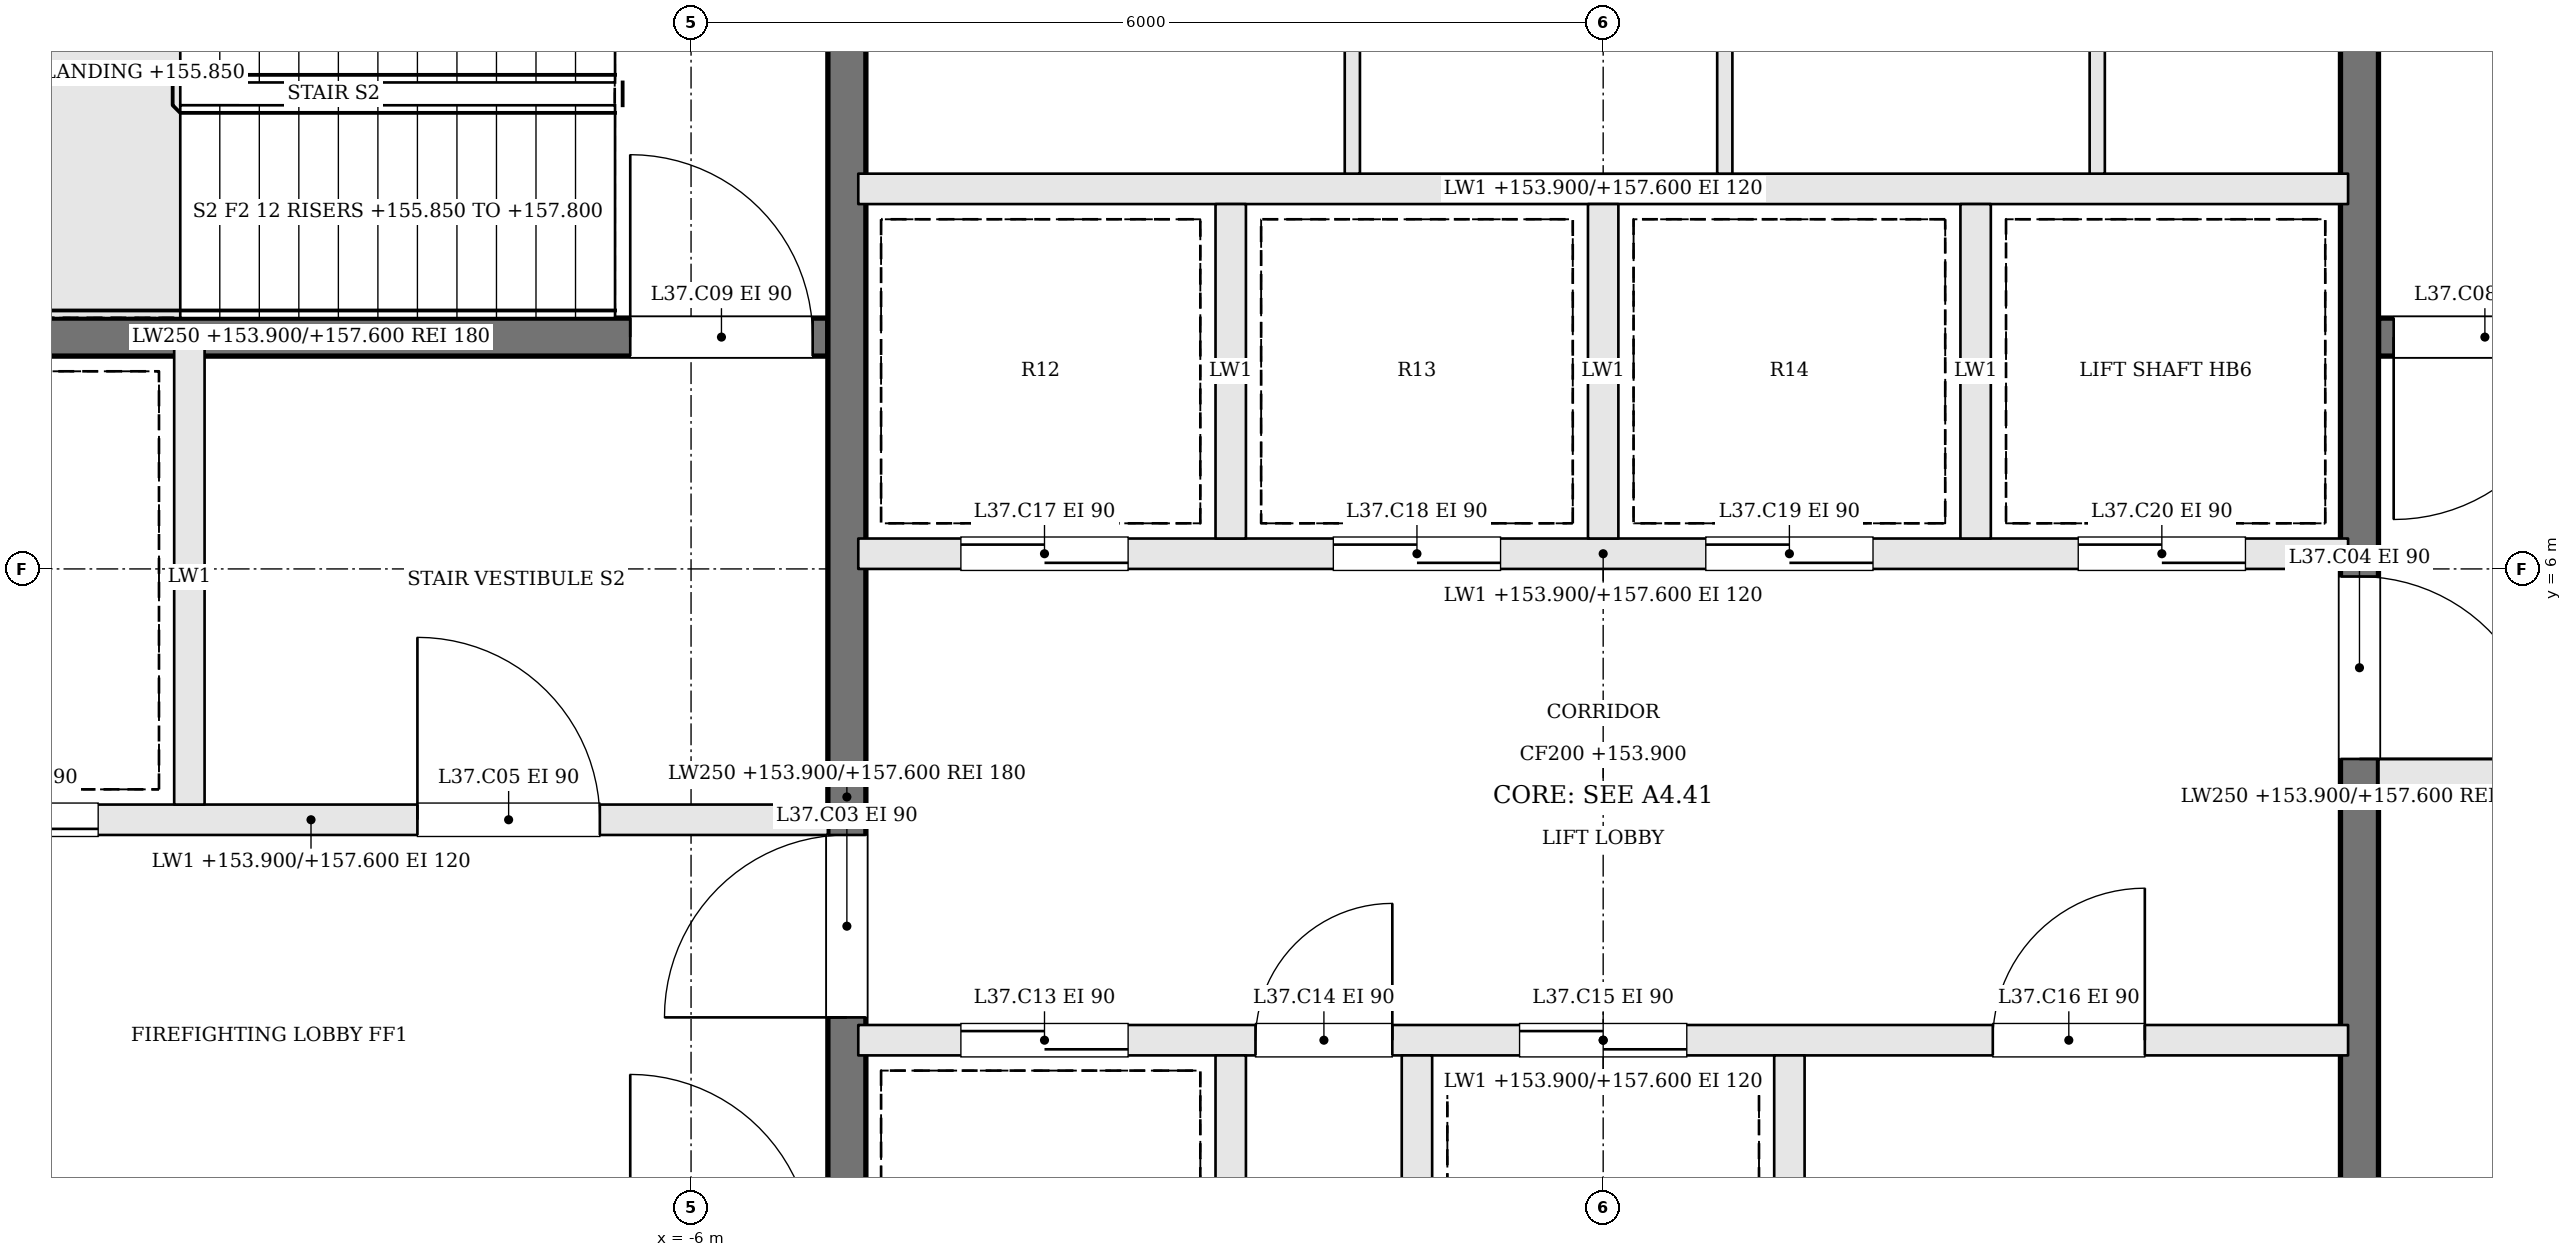
"""IFC4 building model, lengths in metres.
Left out: names, types, materials, properties, quantities, classifications, styles, units other than length and angle.
Written with IfcOpenShell. Run it as: python <this file> out.ifc"""

import sys

from ifc_helpers import new_model, si_unit, direction, frame, frame_2d, origin, place, context, subcontext, project, spatial, rectangle, extrude, element, fill, save


model = new_model("IFC4")
c1 = context("Model", 3, precision=1e-05, world=origin(), true_north=direction((0.0, 1.0)))
c2 = subcontext(c1, "Body", "Model", "MODEL_VIEW")
j1 = project(units=[si_unit("LENGTHUNIT", "METRE"), si_unit("PLANEANGLEUNIT", "RADIAN")], contexts=[c1])
p1 = place(None, origin())
s1 = spatial("IfcSite", under=j1, at=p1, CompositionType="ELEMENT")
p2 = place(p1, origin())
s2 = spatial("IfcBuilding", under=s1, at=p2, CompositionType="ELEMENT")
p3 = place(p2, frame((0.0, 0.0, 153.9)))
s3 = spatial("IfcBuildingStorey", under=s2, at=p3, CompositionType="ELEMENT", Elevation=153.9)
p4 = place(p3, frame((11.9, 7.525, 0.0), z_axis=(0.0, 0.0, 1.0), x_axis=(-1.0, 0.0, 0.0)))
e1 = element("IfcWall", 1, at=p4, inside=s3, PredefinedType="SOLIDWALL", context=c2, shape_type="SweptSolid", body=[
    extrude(rectangle(XDim=6.8, YDim=0.25, at=frame_2d((3.4, 0.0))), origin(), (0.0, 0.0, 1.0), 3.7),
])
p5 = place(p4, frame((5.5, 0.0, 0.0)))
e2 = element("IfcOpeningElement", 2, at=p5, cuts=e1, PredefinedType="OPENING", context=c2, shape_type="SweptSolid", body=[
    extrude(rectangle(XDim=1.2, YDim=2.1, at=frame_2d((0.6, 1.05))), frame((0.0, 0.135, 0.0), z_axis=(0.0, -1.0, 0.0), x_axis=(1.0, 0.0, 0.0)), (0.0, 0.0, 1.0), 0.27),
])
p6 = place(p3, frame((-11.9, 4.35, 0.0), z_axis=(0.0, 0.0, 1.0), x_axis=(1.0, 0.0, 0.0)))
e3 = element("IfcWall", 3, at=p6, inside=s3, PredefinedType="SOLIDWALL", context=c2, shape_type="SweptSolid", body=[
    extrude(rectangle(XDim=6.8, YDim=0.2, at=frame_2d((3.4, 0.0))), origin(), (0.0, 0.0, 1.0), 3.7),
])
p7 = place(p6, frame((4.1, 0.0, 0.0)))
e4 = element("IfcOpeningElement", 4, at=p7, cuts=e3, PredefinedType="OPENING", context=c2, shape_type="SweptSolid", body=[
    extrude(rectangle(XDim=1.2, YDim=2.1, at=frame_2d((0.6, 1.05))), frame((0.0, 0.11, 0.0), z_axis=(0.0, -1.0, 0.0), x_axis=(1.0, 0.0, 0.0)), (0.0, 0.0, 1.0), 0.22),
])
p8 = place(p6, frame((0.8, 0.0, 0.0)))
e5 = element("IfcOpeningElement", 5, at=p8, cuts=e3, PredefinedType="OPENING", context=c2, shape_type="SweptSolid", body=[
    extrude(rectangle(XDim=1.2, YDim=2.1, at=frame_2d((0.6, 1.05))), frame((0.0, 0.11, 0.0), z_axis=(0.0, -1.0, 0.0), x_axis=(1.0, 0.0, 0.0)), (0.0, 0.0, 1.0), 0.22),
])
p9 = place(p3, frame((11.9, 4.65, 0.0), z_axis=(0.0, 0.0, 1.0), x_axis=(-1.0, 0.0, 0.0)))
e6 = element("IfcWall", 6, at=p9, inside=s3, PredefinedType="SOLIDWALL", context=c2, shape_type="SweptSolid", body=[
    extrude(rectangle(XDim=6.8, YDim=0.2, at=frame_2d((3.4, 0.0))), origin(), (0.0, 0.0, 1.0), 3.7),
])
p10 = place(p9, frame((4.1, 0.0, 0.0)))
e7 = element("IfcOpeningElement", 7, at=p10, cuts=e6, PredefinedType="OPENING", context=c2, shape_type="SweptSolid", body=[
    extrude(rectangle(XDim=1.2, YDim=2.1, at=frame_2d((0.6, 1.05))), frame((0.0, 0.11, 0.0), z_axis=(0.0, -1.0, 0.0), x_axis=(1.0, 0.0, 0.0)), (0.0, 0.0, 1.0), 0.22),
])
p11 = place(p9, frame((0.8, 0.0, 0.0)))
e8 = element("IfcOpeningElement", 8, at=p11, cuts=e6, PredefinedType="OPENING", context=c2, shape_type="SweptSolid", body=[
    extrude(rectangle(XDim=1.2, YDim=2.1, at=frame_2d((0.6, 1.05))), frame((0.0, 0.11, 0.0), z_axis=(0.0, -1.0, 0.0), x_axis=(1.0, 0.0, 0.0)), (0.0, 0.0, 1.0), 0.22),
])
p12 = place(p3, frame((-11.9, 7.525, 0.0), z_axis=(0.0, 0.0, 1.0), x_axis=(1.0, 0.0, 0.0)))
e9 = element("IfcWall", 9, at=p12, inside=s3, PredefinedType="SOLIDWALL", context=c2, shape_type="SweptSolid", body=[
    extrude(rectangle(XDim=6.8, YDim=0.25, at=frame_2d((3.4, 0.0))), origin(), (0.0, 0.0, 1.0), 3.7),
])
p13 = place(p12, frame((5.5, 0.0, 0.0)))
e10 = element("IfcOpeningElement", 10, at=p13, cuts=e9, PredefinedType="OPENING", context=c2, shape_type="SweptSolid", body=[
    extrude(rectangle(XDim=1.2, YDim=2.1, at=frame_2d((0.6, 1.05))), frame((0.0, 0.135, 0.0), z_axis=(0.0, -1.0, 0.0), x_axis=(1.0, 0.0, 0.0)), (0.0, 0.0, 1.0), 0.27),
])
p14 = place(p3, frame((-9.3, 4.45, 0.0), z_axis=(0.0, 0.0, 1.0), x_axis=(0.0, 1.0, 0.0)))
e11 = element("IfcWall", 11, at=p14, inside=s3, PredefinedType="SOLIDWALL", context=c2, shape_type="SweptSolid", body=[
    extrude(rectangle(XDim=3.0, YDim=0.2, at=frame_2d((1.5, 0.0))), origin(), (0.0, 0.0, 1.0), 3.7),
])
p15 = place(p3, frame((-4.975, -1.9, 0.0), z_axis=(0.0, 0.0, 1.0), x_axis=(0.0, 1.0, 0.0)))
e12 = element("IfcWall", 12, at=p15, inside=s3, PredefinedType="SOLIDWALL", context=c2, shape_type="SweptSolid", body=[
    extrude(rectangle(XDim=12.8, YDim=0.25, at=frame_2d((6.4, 0.0))), origin(), (0.0, 0.0, 1.0), 3.7),
])
p16 = place(p15, frame((4.95, 0.0, 0.0)))
e13 = element("IfcOpeningElement", 13, at=p16, cuts=e12, PredefinedType="OPENING", context=c2, shape_type="SweptSolid", body=[
    extrude(rectangle(XDim=1.2, YDim=2.1, at=frame_2d((0.6, 1.05))), frame((0.0, 0.135, 0.0), z_axis=(0.0, -1.0, 0.0), x_axis=(1.0, 0.0, 0.0)), (0.0, 0.0, 1.0), 0.27),
])
p17 = place(p3, frame((4.975, 10.9, 0.0), z_axis=(0.0, 0.0, 1.0), x_axis=(0.0, -1.0, 0.0)))
e14 = element("IfcWall", 14, at=p17, inside=s3, PredefinedType="SOLIDWALL", context=c2, shape_type="SweptSolid", body=[
    extrude(rectangle(XDim=12.8, YDim=0.25, at=frame_2d((6.4, 0.0))), origin(), (0.0, 0.0, 1.0), 3.7),
])
p18 = place(p17, frame((4.95, 0.0, 0.0)))
e15 = element("IfcOpeningElement", 15, at=p18, cuts=e14, PredefinedType="OPENING", context=c2, shape_type="SweptSolid", body=[
    extrude(rectangle(XDim=1.2, YDim=2.1, at=frame_2d((0.6, 1.05))), frame((0.0, 0.135, 0.0), z_axis=(0.0, -1.0, 0.0), x_axis=(1.0, 0.0, 0.0)), (0.0, 0.0, 1.0), 0.27),
])
p19 = place(p3, frame((-4.9, 2.9, 0.0), z_axis=(0.0, 0.0, 1.0), x_axis=(1.0, 0.0, 0.0)))
e16 = element("IfcWall", 16, at=p19, inside=s3, PredefinedType="SOLIDWALL", context=c2, shape_type="SweptSolid", body=[
    extrude(rectangle(XDim=9.8, YDim=0.2, at=frame_2d((4.9, 0.0))), origin(), (0.0, 0.0, 1.0), 3.7),
])
p20 = place(p19, frame((0.675, 0.0, 0.0)))
e17 = element("IfcOpeningElement", 17, at=p20, cuts=e16, PredefinedType="OPENING", context=c2, shape_type="SweptSolid", body=[
    extrude(rectangle(XDim=1.1, YDim=2.1, at=frame_2d((0.55, 1.05))), frame((0.0, 0.11, 0.0), z_axis=(0.0, -1.0, 0.0), x_axis=(1.0, 0.0, 0.0)), (0.0, 0.0, 1.0), 0.22),
])
p21 = place(p19, frame((2.613, 0.0, 0.0)))
e18 = element("IfcOpeningElement", 18, at=p21, cuts=e16, PredefinedType="OPENING", context=c2, shape_type="SweptSolid", body=[
    extrude(rectangle(XDim=0.9, YDim=2.1, at=frame_2d((0.45, 1.05))), frame((0.0, 0.11, 0.0), z_axis=(0.0, -1.0, 0.0), x_axis=(1.0, 0.0, 0.0)), (0.0, 0.0, 1.0), 0.22),
])
p22 = place(p19, frame((4.35, 0.0, 0.0)))
e19 = element("IfcOpeningElement", 19, at=p22, cuts=e16, PredefinedType="OPENING", context=c2, shape_type="SweptSolid", body=[
    extrude(rectangle(XDim=1.1, YDim=2.1, at=frame_2d((0.55, 1.05))), frame((0.0, 0.11, 0.0), z_axis=(0.0, -1.0, 0.0), x_axis=(1.0, 0.0, 0.0)), (0.0, 0.0, 1.0), 0.22),
])
p23 = place(p19, frame((7.463, 0.0, 0.0)))
e20 = element("IfcOpeningElement", 20, at=p23, cuts=e16, PredefinedType="OPENING", context=c2, shape_type="SweptSolid", body=[
    extrude(rectangle(XDim=1.0, YDim=2.1, at=frame_2d((0.5, 1.05))), frame((0.0, 0.11, 0.0), z_axis=(0.0, -1.0, 0.0), x_axis=(1.0, 0.0, 0.0)), (0.0, 0.0, 1.0), 0.22),
])
p24 = place(p3, frame((-4.9, 6.1, 0.0), z_axis=(0.0, 0.0, 1.0), x_axis=(1.0, 0.0, 0.0)))
e21 = element("IfcWall", 21, at=p24, inside=s3, PredefinedType="SOLIDWALL", context=c2, shape_type="SweptSolid", body=[
    extrude(rectangle(XDim=9.8, YDim=0.2, at=frame_2d((4.9, 0.0))), origin(), (0.0, 0.0, 1.0), 3.7),
])
p25 = place(p24, frame((0.675, 0.0, 0.0)))
e22 = element("IfcOpeningElement", 22, at=p25, cuts=e21, PredefinedType="OPENING", context=c2, shape_type="SweptSolid", body=[
    extrude(rectangle(XDim=1.1, YDim=2.1, at=frame_2d((0.55, 1.05))), frame((0.0, 0.11, 0.0), z_axis=(0.0, -1.0, 0.0), x_axis=(1.0, 0.0, 0.0)), (0.0, 0.0, 1.0), 0.22),
])
p26 = place(p24, frame((3.125, 0.0, 0.0)))
e23 = element("IfcOpeningElement", 23, at=p26, cuts=e21, PredefinedType="OPENING", context=c2, shape_type="SweptSolid", body=[
    extrude(rectangle(XDim=1.1, YDim=2.1, at=frame_2d((0.55, 1.05))), frame((0.0, 0.11, 0.0), z_axis=(0.0, -1.0, 0.0), x_axis=(1.0, 0.0, 0.0)), (0.0, 0.0, 1.0), 0.22),
])
p27 = place(p24, frame((5.575, 0.0, 0.0)))
e24 = element("IfcOpeningElement", 24, at=p27, cuts=e21, PredefinedType="OPENING", context=c2, shape_type="SweptSolid", body=[
    extrude(rectangle(XDim=1.1, YDim=2.1, at=frame_2d((0.55, 1.05))), frame((0.0, 0.11, 0.0), z_axis=(0.0, -1.0, 0.0), x_axis=(1.0, 0.0, 0.0)), (0.0, 0.0, 1.0), 0.22),
])
p28 = place(p24, frame((8.025, 0.0, 0.0)))
e25 = element("IfcOpeningElement", 25, at=p28, cuts=e21, PredefinedType="OPENING", context=c2, shape_type="SweptSolid", body=[
    extrude(rectangle(XDim=1.1, YDim=2.1, at=frame_2d((0.55, 1.05))), frame((0.0, 0.11, 0.0), z_axis=(0.0, -1.0, 0.0), x_axis=(1.0, 0.0, 0.0)), (0.0, 0.0, 1.0), 0.22),
])
p29 = place(p3, frame((-4.9, 8.5, 0.0), z_axis=(0.0, 0.0, 1.0), x_axis=(1.0, 0.0, 0.0)))
e26 = element("IfcWall", 26, at=p29, inside=s3, PredefinedType="SOLIDWALL", context=c2, shape_type="SweptSolid", body=[
    extrude(rectangle(XDim=9.8, YDim=0.2, at=frame_2d((4.9, 0.0))), origin(), (0.0, 0.0, 1.0), 3.7),
])
for number, where, z_axis, x_axis in (
    (27, (-2.45, 0.6, 0.0), (0.0, 0.0, 1.0), (0.0, 1.0, 0.0)),
    (28, (-1.225, 0.6, 0.0), (0.0, 0.0, 1.0), (0.0, 1.0, 0.0)),
    (29, (1.225, 0.6, 0.0), (0.0, 0.0, 1.0), (0.0, 1.0, 0.0)),
    (30, (-2.45, 6.2, 0.0), (0.0, 0.0, 1.0), (0.0, 1.0, 0.0)),
    (31, (0.0, 6.2, 0.0), (0.0, 0.0, 1.0), (0.0, 1.0, 0.0)),
    (32, (2.45, 6.2, 0.0), (0.0, 0.0, 1.0), (0.0, 1.0, 0.0)),
):
    element("IfcWall", number, at=place(p3, frame(where, z_axis=z_axis, x_axis=x_axis)), inside=s3, PredefinedType="SOLIDWALL", context=c2, shape_type="SweptSolid", body=[
        extrude(rectangle(XDim=2.2, YDim=0.2, at=frame_2d((1.1, 0.0))), origin(), (0.0, 0.0, 1.0), 3.7),
    ])
for number, where, z_axis, x_axis in (
    (33, (-1.65, 8.6, 0.0), (0.0, 0.0, 1.0), (0.0, 1.0, 0.0)),
    (34, (0.8, 8.6, 0.0), (0.0, 0.0, 1.0), (0.0, 1.0, 0.0)),
    (35, (3.25, 8.6, 0.0), (0.0, 0.0, 1.0), (0.0, 1.0, 0.0)),
):
    element("IfcWall", number, at=place(p3, frame(where, z_axis=z_axis, x_axis=x_axis)), inside=s3, PredefinedType="PARTITIONING", context=c2, shape_type="SweptSolid", body=[
        extrude(rectangle(XDim=2.3, YDim=0.1, at=frame_2d((1.15, 0.0))), origin(), (0.0, 0.0, 1.0), 3.7),
    ])
p30 = place(p16, origin())
e36 = element("IfcDoor", 36, at=p30, inside=s3, OperationType="SINGLE_SWING_LEFT", PredefinedType="DOOR", context=c2, shape_type="SweptSolid", body=[
    extrude(rectangle(XDim=1.2, YDim=2.1, at=frame_2d((0.6, 1.05))), frame((0.0, 0.025, 0.0), z_axis=(0.0, -1.0, 0.0), x_axis=(1.0, 0.0, 0.0)), (0.0, 0.0, 1.0), 0.05),
])
fill(e13, e36)
p31 = place(p18, origin())
e37 = element("IfcDoor", 37, at=p31, inside=s3, OperationType="SINGLE_SWING_RIGHT", PredefinedType="DOOR", context=c2, shape_type="SweptSolid", body=[
    extrude(rectangle(XDim=1.2, YDim=2.1, at=frame_2d((0.6, 1.05))), frame((0.0, 0.025, 0.0), z_axis=(0.0, -1.0, 0.0), x_axis=(1.0, 0.0, 0.0)), (0.0, 0.0, 1.0), 0.05),
])
fill(e15, e37)
p32 = place(p7, origin())
e38 = element("IfcDoor", 38, at=p32, inside=s3, OperationType="SINGLE_SWING_LEFT", PredefinedType="DOOR", context=c2, shape_type="SweptSolid", body=[
    extrude(rectangle(XDim=1.2, YDim=2.1, at=frame_2d((0.6, 1.05))), frame((0.0, 0.025, 0.0), z_axis=(0.0, -1.0, 0.0), x_axis=(1.0, 0.0, 0.0)), (0.0, 0.0, 1.0), 0.05),
])
fill(e4, e38)
p33 = place(p5, origin())
e39 = element("IfcDoor", 39, at=p33, inside=s3, OperationType="SINGLE_SWING_RIGHT", PredefinedType="DOOR", context=c2, shape_type="SweptSolid", body=[
    extrude(rectangle(XDim=1.2, YDim=2.1, at=frame_2d((0.6, 1.05))), frame((0.0, 0.025, 0.0), z_axis=(0.0, -1.0, 0.0), x_axis=(1.0, 0.0, 0.0)), (0.0, 0.0, 1.0), 0.05),
])
fill(e2, e39)
p34 = place(p13, origin())
e40 = element("IfcDoor", 40, at=p34, inside=s3, OperationType="SINGLE_SWING_LEFT", PredefinedType="DOOR", context=c2, shape_type="SweptSolid", body=[
    extrude(rectangle(XDim=1.2, YDim=2.1, at=frame_2d((0.6, 1.05))), frame((0.0, 0.025, 0.0), z_axis=(0.0, -1.0, 0.0), x_axis=(1.0, 0.0, 0.0)), (0.0, 0.0, 1.0), 0.05),
])
fill(e10, e40)
p35 = place(p8, origin())
e41 = element("IfcDoor", 41, at=p35, inside=s3, OperationType="SLIDING_TO_RIGHT", PredefinedType="DOOR", context=c2, shape_type="SweptSolid", body=[
    extrude(rectangle(XDim=1.2, YDim=2.1, at=frame_2d((0.6, 1.05))), frame((0.0, 0.025, 0.0), z_axis=(0.0, -1.0, 0.0), x_axis=(1.0, 0.0, 0.0)), (0.0, 0.0, 1.0), 0.05),
])
fill(e5, e41)
p36 = place(p20, origin())
e42 = element("IfcDoor", 42, at=p36, inside=s3, OperationType="SLIDING_TO_RIGHT", PredefinedType="DOOR", context=c2, shape_type="SweptSolid", body=[
    extrude(rectangle(XDim=1.1, YDim=2.1, at=frame_2d((0.55, 1.05))), frame((0.0, 0.025, 0.0), z_axis=(0.0, -1.0, 0.0), x_axis=(1.0, 0.0, 0.0)), (0.0, 0.0, 1.0), 0.05),
])
fill(e17, e42)
p37 = place(p21, origin())
e43 = element("IfcDoor", 43, at=p37, inside=s3, OperationType="SINGLE_SWING_RIGHT", PredefinedType="DOOR", context=c2, shape_type="SweptSolid", body=[
    extrude(rectangle(XDim=0.9, YDim=2.1, at=frame_2d((0.45, 1.05))), frame((0.0, 0.025, 0.0), z_axis=(0.0, -1.0, 0.0), x_axis=(1.0, 0.0, 0.0)), (0.0, 0.0, 1.0), 0.05),
])
fill(e18, e43)
p38 = place(p22, origin())
e44 = element("IfcDoor", 44, at=p38, inside=s3, OperationType="SLIDING_TO_LEFT", PredefinedType="DOOR", context=c2, shape_type="SweptSolid", body=[
    extrude(rectangle(XDim=1.1, YDim=2.1, at=frame_2d((0.55, 1.05))), frame((0.0, 0.025, 0.0), z_axis=(0.0, -1.0, 0.0), x_axis=(1.0, 0.0, 0.0)), (0.0, 0.0, 1.0), 0.05),
])
fill(e19, e44)
p39 = place(p23, origin())
e45 = element("IfcDoor", 45, at=p39, inside=s3, OperationType="SINGLE_SWING_RIGHT", PredefinedType="DOOR", context=c2, shape_type="SweptSolid", body=[
    extrude(rectangle(XDim=1.0, YDim=2.1, at=frame_2d((0.5, 1.05))), frame((0.0, 0.025, 0.0), z_axis=(0.0, -1.0, 0.0), x_axis=(1.0, 0.0, 0.0)), (0.0, 0.0, 1.0), 0.05),
])
fill(e20, e45)
p40 = place(p25, origin())
e46 = element("IfcDoor", 46, at=p40, inside=s3, OperationType="SLIDING_TO_RIGHT", PredefinedType="DOOR", context=c2, shape_type="SweptSolid", body=[
    extrude(rectangle(XDim=1.1, YDim=2.1, at=frame_2d((0.55, 1.05))), frame((0.0, 0.025, 0.0), z_axis=(0.0, -1.0, 0.0), x_axis=(1.0, 0.0, 0.0)), (0.0, 0.0, 1.0), 0.05),
])
fill(e22, e46)
p41 = place(p26, origin())
e47 = element("IfcDoor", 47, at=p41, inside=s3, OperationType="SLIDING_TO_LEFT", PredefinedType="DOOR", context=c2, shape_type="SweptSolid", body=[
    extrude(rectangle(XDim=1.1, YDim=2.1, at=frame_2d((0.55, 1.05))), frame((0.0, 0.025, 0.0), z_axis=(0.0, -1.0, 0.0), x_axis=(1.0, 0.0, 0.0)), (0.0, 0.0, 1.0), 0.05),
])
fill(e23, e47)
p42 = place(p27, origin())
e48 = element("IfcDoor", 48, at=p42, inside=s3, OperationType="SLIDING_TO_RIGHT", PredefinedType="DOOR", context=c2, shape_type="SweptSolid", body=[
    extrude(rectangle(XDim=1.1, YDim=2.1, at=frame_2d((0.55, 1.05))), frame((0.0, 0.025, 0.0), z_axis=(0.0, -1.0, 0.0), x_axis=(1.0, 0.0, 0.0)), (0.0, 0.0, 1.0), 0.05),
])
fill(e24, e48)
p43 = place(p28, origin())
e49 = element("IfcDoor", 49, at=p43, inside=s3, OperationType="SLIDING_TO_LEFT", PredefinedType="DOOR", context=c2, shape_type="SweptSolid", body=[
    extrude(rectangle(XDim=1.1, YDim=2.1, at=frame_2d((0.55, 1.05))), frame((0.0, 0.025, 0.0), z_axis=(0.0, -1.0, 0.0), x_axis=(1.0, 0.0, 0.0)), (0.0, 0.0, 1.0), 0.05),
])
fill(e25, e49)
save(model, sys.argv[1])
